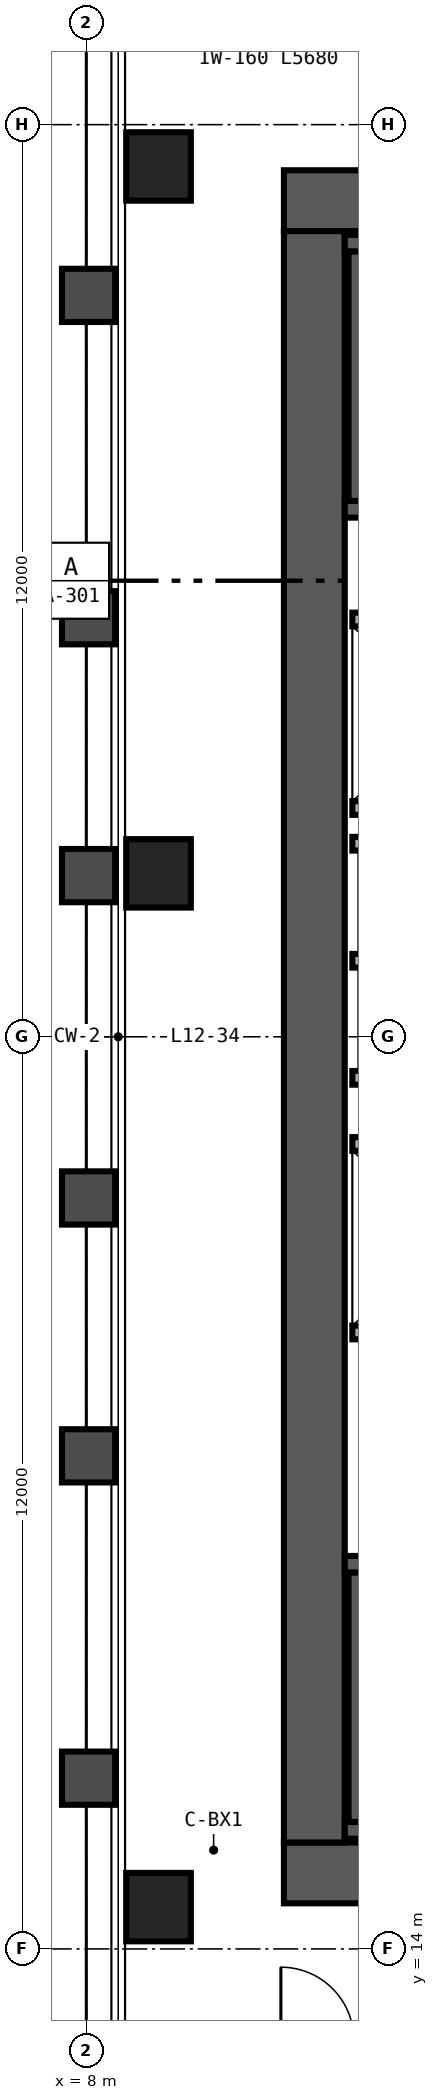
"""IFC4 building model, lengths in metres.
Left out: names, types, materials, properties, quantities, classifications, styles, units other than length and angle.
Written with IfcOpenShell. Run it as: python <this file> out.ifc"""

import sys

from ifc_helpers import new_model, si_unit, direction, frame, frame_2d, origin, origin_2d, place, context, subcontext, project, spatial, rectangle, hollow_rectangle, extrude, source, transform, mapped, element, save


model = new_model("IFC4")
c1 = context("Model", 3, precision=1e-05, world=origin(), true_north=direction((0.0, 1.0)))
c2 = subcontext(c1, "Body", "Model", "MODEL_VIEW")
j1 = project(units=[si_unit("LENGTHUNIT", "METRE"), si_unit("PLANEANGLEUNIT", "RADIAN")], contexts=[c1])
p1 = place(None, origin())
s1 = spatial("IfcSite", under=j1, at=p1, CompositionType="ELEMENT")
p2 = place(p1, origin())
s2 = spatial("IfcBuilding", under=s1, at=p2, CompositionType="ELEMENT")
p3 = place(p2, frame((0.0, 0.0, 52.8)))
s3 = spatial("IfcBuildingStorey", under=s2, at=p3, CompositionType="ELEMENT", Elevation=52.8)
p4 = place(p3, frame((10.6, 15.0, 0.0), z_axis=(0.0, 0.0, 1.0), x_axis=(1.0, 0.0, 0.0)))
e1 = element("IfcWall", 1, at=p4, inside=s3, PredefinedType="SHEAR", context=c2, shape_type="SweptSolid", body=[
    extrude(rectangle(XDim=12.8, YDim=0.8, at=frame_2d((6.4, 0.0))), origin(), (0.0, 0.0, 1.0), 3.35),
])
p5 = place(p4, frame((10.3, 0.0, 0.0)))
e2 = element("IfcOpeningElement", 2, at=p5, cuts=e1, PredefinedType="OPENING", context=c2, shape_type="SweptSolid", body=[
    extrude(rectangle(XDim=1.0, YDim=2.15, at=frame_2d((0.5, 1.075))), frame((0.0, 0.41, 0.0), z_axis=(0.0, -1.0, 0.0), x_axis=(1.0, 0.0, 0.0)), (0.0, 0.0, 1.0), 0.82),
])
p6 = place(p3, frame((10.6, 37.0, 0.0), z_axis=(0.0, 0.0, 1.0), x_axis=(1.0, 0.0, 0.0)))
e3 = element("IfcWall", 3, at=p6, inside=s3, PredefinedType="SHEAR", context=c2, shape_type="SweptSolid", body=[
    extrude(rectangle(XDim=12.8, YDim=0.8, at=frame_2d((6.4, 0.0))), origin(), (0.0, 0.0, 1.0), 3.35),
])
p7 = place(p6, frame((10.5, 0.0, 0.0)))
e4 = element("IfcOpeningElement", 4, at=p7, cuts=e3, PredefinedType="OPENING", context=c2, shape_type="SweptSolid", body=[
    extrude(rectangle(XDim=1.0, YDim=2.15, at=frame_2d((0.5, 1.075))), frame((0.0, 0.41, 0.0), z_axis=(0.0, -1.0, 0.0), x_axis=(1.0, 0.0, 0.0)), (0.0, 0.0, 1.0), 0.82),
])
p8 = place(p3, frame((11.0, 15.4, 0.0), z_axis=(0.0, 0.0, 1.0), x_axis=(0.0, 1.0, 0.0)))
e5 = element("IfcWall", 5, at=p8, inside=s3, PredefinedType="SHEAR", context=c2, shape_type="SweptSolid", body=[
    extrude(rectangle(XDim=21.2, YDim=0.8, at=frame_2d((10.6, 0.0))), origin(), (0.0, 0.0, 1.0), 3.35),
])
p9 = place(p3, frame((11.4, 15.56, 0.0), z_axis=(0.0, 0.0, 1.0), x_axis=(1.0, 0.0, 0.0)))
e6 = element("IfcWall", 6, at=p9, inside=s3, PredefinedType="SHEAR", context=c2, shape_type="SweptSolid", body=[
    extrude(rectangle(XDim=7.91, YDim=0.22, at=frame_2d((3.955, 0.0))), origin(), (0.0, 0.0, 1.0), 3.4),
])
p10 = place(p3, frame((11.4, 19.06, 0.0), z_axis=(0.0, 0.0, 1.0), x_axis=(1.0, 0.0, 0.0)))
e7 = element("IfcWall", 7, at=p10, inside=s3, PredefinedType="SHEAR", context=c2, shape_type="SweptSolid", body=[
    extrude(rectangle(XDim=7.91, YDim=0.22, at=frame_2d((3.955, 0.0))), origin(), (0.0, 0.0, 1.0), 3.4),
])
p11 = place(p10, frame((0.52, 0.0, 0.0)))
e8 = element("IfcOpeningElement", 8, at=p11, cuts=e7, PredefinedType="OPENING", context=c2, shape_type="SweptSolid", body=[
    extrude(rectangle(XDim=1.05, YDim=2.15, at=frame_2d((0.525, 1.075))), frame((0.0, 0.12, 0.0), z_axis=(0.0, -1.0, 0.0), x_axis=(1.0, 0.0, 0.0)), (0.0, 0.0, 1.0), 0.24),
])
p12 = place(p3, frame((11.56, 15.67, 0.0), z_axis=(0.0, 0.0, 1.0), x_axis=(0.0, 1.0, 0.0)))
e9 = element("IfcWall", 9, at=p12, inside=s3, PredefinedType="SHEAR", context=c2, shape_type="SweptSolid", body=[
    extrude(rectangle(XDim=3.28, YDim=0.22, at=frame_2d((1.64, 0.0))), origin(), (0.0, 0.0, 1.0), 3.4),
])
p13 = place(p3, frame((11.4, 32.94, 0.0), z_axis=(0.0, 0.0, 1.0), x_axis=(1.0, 0.0, 0.0)))
e10 = element("IfcWall", 10, at=p13, inside=s3, PredefinedType="SHEAR", context=c2, shape_type="SweptSolid", body=[
    extrude(rectangle(XDim=7.91, YDim=0.22, at=frame_2d((3.955, 0.0))), origin(), (0.0, 0.0, 1.0), 3.4),
])
p14 = place(p13, frame((0.52, 0.0, 0.0)))
e11 = element("IfcOpeningElement", 11, at=p14, cuts=e10, PredefinedType="OPENING", context=c2, shape_type="SweptSolid", body=[
    extrude(rectangle(XDim=1.05, YDim=2.15, at=frame_2d((0.525, 1.075))), frame((0.0, 0.12, 0.0), z_axis=(0.0, -1.0, 0.0), x_axis=(1.0, 0.0, 0.0)), (0.0, 0.0, 1.0), 0.24),
])
p15 = place(p3, frame((11.4, 36.44, 0.0), z_axis=(0.0, 0.0, 1.0), x_axis=(1.0, 0.0, 0.0)))
e12 = element("IfcWall", 12, at=p15, inside=s3, PredefinedType="SHEAR", context=c2, shape_type="SweptSolid", body=[
    extrude(rectangle(XDim=7.91, YDim=0.22, at=frame_2d((3.955, 0.0))), origin(), (0.0, 0.0, 1.0), 3.4),
])
p16 = place(p3, frame((11.56, 33.05, 0.0), z_axis=(0.0, 0.0, 1.0), x_axis=(0.0, 1.0, 0.0)))
e13 = element("IfcWall", 13, at=p16, inside=s3, PredefinedType="SHEAR", context=c2, shape_type="SweptSolid", body=[
    extrude(rectangle(XDim=3.28, YDim=0.22, at=frame_2d((1.64, 0.0))), origin(), (0.0, 0.0, 1.0), 3.4),
])
m1 = source(origin(), c2, "Body", "SweptSolid", [
    extrude(hollow_rectangle(XDim=0.85, YDim=0.9, WallThickness=0.04, at=origin_2d()), origin(), (0.0, 0.0, 1.0), 3.35),
])
for number, where, z_axis, x_axis in (
    (14, (8.95, 14.55, 0.0), (0.0, 0.0, 1.0), (1.0, 0.0, 0.0)),
    (15, (8.95, 28.15, 0.0), (0.0, 0.0, 1.0), (1.0, 0.0, 0.0)),
    (16, (8.95, 37.45, 0.0), (0.0, 0.0, 1.0), (1.0, 0.0, 0.0)),
):
    element("IfcColumn", number, at=place(p3, frame(where, z_axis=z_axis, x_axis=x_axis)), inside=s3, PredefinedType="COLUMN", context=c2, shape_type="MappedRepresentation", body=[
        mapped(m1, transform((0.0, 0.0, 0.0), scale=1.0)),
    ])
for number, where, z_axis, x_axis in (
    (17, (11.5, 22.11, 0.0), (0.0, 0.0, 1.0), (1.0, 0.0, 0.0)),
    (18, (11.5, 24.59, 0.0), (0.0, 0.0, 1.0), (1.0, 0.0, 0.0)),
    (19, (11.5, 29.01, 0.0), (0.0, 0.0, 1.0), (1.0, 0.0, 0.0)),
    (20, (11.5, 31.49, 0.0), (0.0, 0.0, 1.0), (1.0, 0.0, 0.0)),
):
    element("IfcWall", number, at=place(p3, frame(where, z_axis=z_axis, x_axis=x_axis)), inside=s3, PredefinedType="SOLIDWALL", context=c2, shape_type="SweptSolid", body=[
        extrude(rectangle(XDim=2.5, YDim=0.18, at=frame_2d((1.25, 0.0))), origin(), (0.0, 0.0, 1.0), 3.35),
    ])
for number, where, z_axis, x_axis in (
    (21, (11.5, 25.46, 0.0), (0.0, 0.0, 1.0), (1.0, 0.0, 0.0)),
    (22, (11.5, 27.0, 0.0), (0.0, 0.0, 1.0), (1.0, 0.0, 0.0)),
    (23, (11.5, 28.54, 0.0), (0.0, 0.0, 1.0), (1.0, 0.0, 0.0)),
):
    element("IfcWall", number, at=place(p3, frame(where, z_axis=z_axis, x_axis=x_axis)), inside=s3, PredefinedType="SOLIDWALL", context=c2, shape_type="SweptSolid", body=[
        extrude(rectangle(XDim=2.51, YDim=0.18, at=frame_2d((1.255, 0.0))), origin(), (0.0, 0.0, 1.0), 3.35),
    ])
save(model, sys.argv[1])
